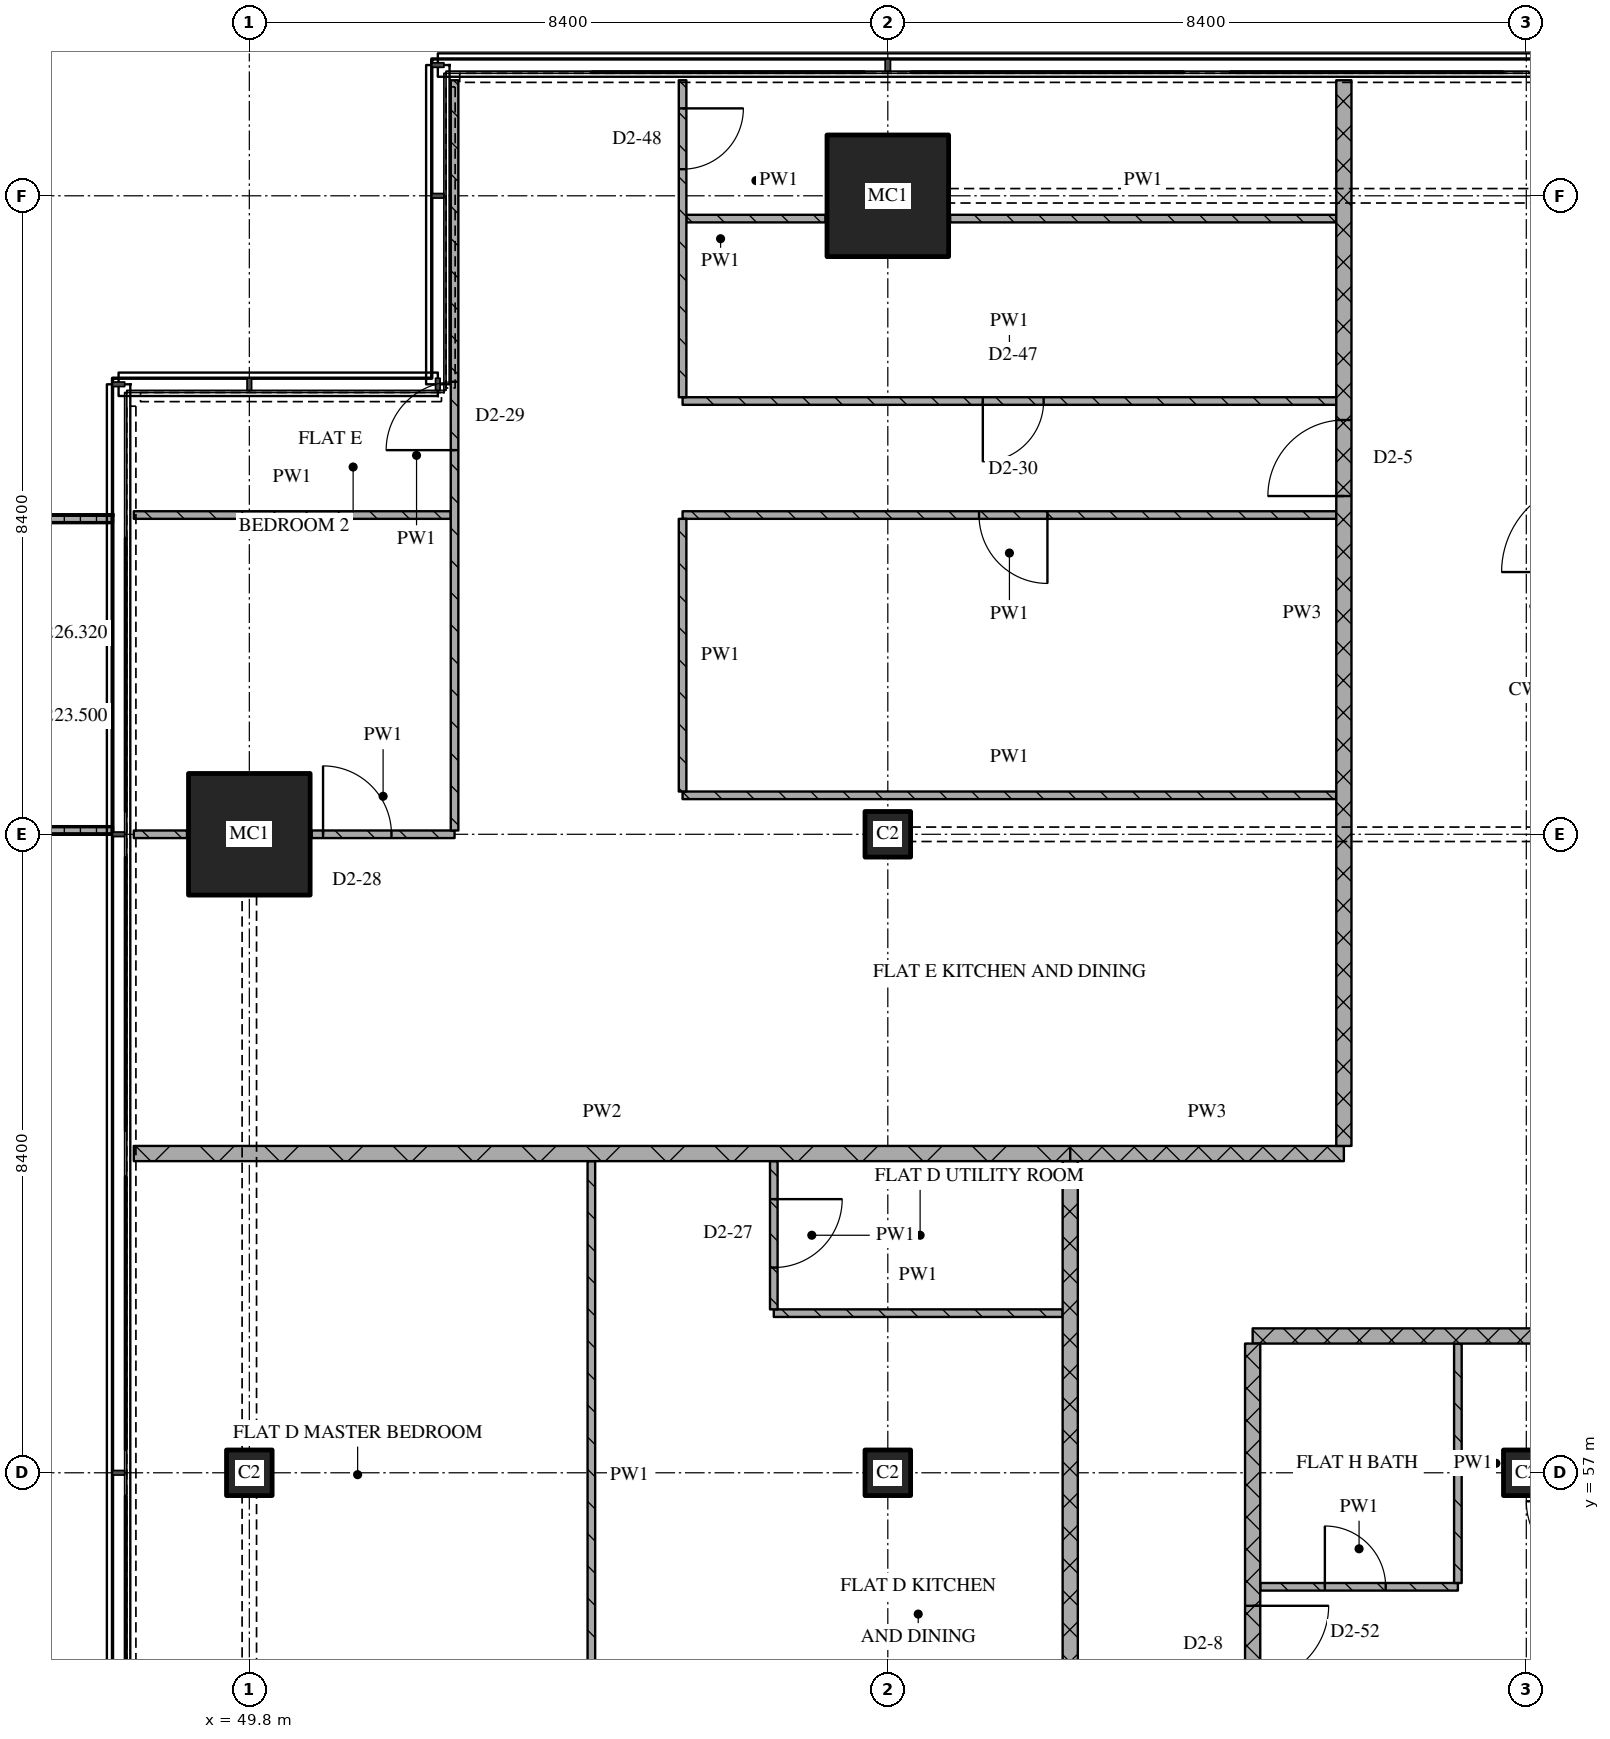
"""IFC4 building model, lengths in metres.
Left out: names, types, materials, properties, quantities, classifications, styles, units other than length and angle.
Written with IfcOpenShell. Run it as: python <this file> out.ifc"""

import sys

from ifc_helpers import new_model, si_unit, direction, frame, frame_2d, origin, origin_2d, place, context, subcontext, project, spatial, polyline, rectangle, outline, extrude, element, fill, save


model = new_model("IFC4")
c1 = context("Model", 3, precision=1e-05, world=origin(), true_north=direction((0.0, 1.0)))
c2 = subcontext(c1, "Body", "Model", "MODEL_VIEW")
j1 = project(units=[si_unit("LENGTHUNIT", "METRE"), si_unit("PLANEANGLEUNIT", "RADIAN")], contexts=[c1])
p1 = place(None, origin())
s1 = spatial("IfcSite", under=j1, at=p1, CompositionType="ELEMENT")
p2 = place(p1, origin())
s2 = spatial("IfcBuilding", under=s1, at=p2, CompositionType="ELEMENT")
p3 = place(p2, frame((0.0, 0.0, 223.5)))
s3 = spatial("IfcBuildingStorey", under=s2, at=p3, CompositionType="ELEMENT", Elevation=223.5)
p4 = place(p3, frame((49.8, 57.0, 0.0), z_axis=(0.0, 0.0, 1.0), x_axis=(1.0, 0.0, 0.0)))
e1 = element("IfcColumn", 1, at=p4, inside=s3, PredefinedType="COLUMN", context=c2, shape_type="SweptSolid", body=[
    extrude(rectangle(XDim=0.6, YDim=0.6, at=origin_2d()), origin(), (0.0, 0.0, 1.0), 3.6),
])
p5 = place(p3, frame((49.8, 65.4, 0.0), z_axis=(0.0, 0.0, 1.0), x_axis=(1.0, 0.0, 0.0)))
e2 = element("IfcColumn", 2, at=p5, inside=s3, PredefinedType="COLUMN", context=c2, shape_type="SweptSolid", body=[
    extrude(rectangle(XDim=1.6, YDim=1.6, at=origin_2d()), origin(), (0.0, 0.0, 1.0), 3.6),
])
for number, where, z_axis, x_axis in (
    (3, (58.2, 57.0, 0.0), (0.0, 0.0, 1.0), (1.0, 0.0, 0.0)),
    (4, (58.2, 65.4, 0.0), (0.0, 0.0, 1.0), (1.0, 0.0, 0.0)),
):
    element("IfcColumn", number, at=place(p3, frame(where, z_axis=z_axis, x_axis=x_axis)), inside=s3, PredefinedType="COLUMN", context=c2, shape_type="SweptSolid", body=[
        extrude(rectangle(XDim=0.6, YDim=0.6, at=origin_2d()), origin(), (0.0, 0.0, 1.0), 3.6),
    ])
p6 = place(p3, frame((58.2, 73.8, 0.0), z_axis=(0.0, 0.0, 1.0), x_axis=(1.0, 0.0, 0.0)))
e5 = element("IfcColumn", 5, at=p6, inside=s3, PredefinedType="COLUMN", context=c2, shape_type="SweptSolid", body=[
    extrude(rectangle(XDim=1.6, YDim=1.6, at=origin_2d()), origin(), (0.0, 0.0, 1.0), 3.6),
])
p7 = place(p3, frame((66.6, 57.0, 0.0), z_axis=(0.0, 0.0, 1.0), x_axis=(1.0, 0.0, 0.0)))
e6 = element("IfcColumn", 6, at=p7, inside=s3, PredefinedType="COLUMN", context=c2, shape_type="SweptSolid", body=[
    extrude(rectangle(XDim=0.6, YDim=0.6, at=origin_2d()), origin(), (0.0, 0.0, 1.0), 3.6),
])
p8 = place(p3, origin())
e7 = element("IfcWall", 7, at=p8, inside=s3, PredefinedType="SOLIDWALL", context=c2, shape_type="SweptSolid", body=[
    extrude(outline(polyline([(48.0, 69.6), (48.0, 69.5), (46.367, 69.5), (46.367, 65.5), (48.0, 65.5), (48.0, 65.4), (46.267, 65.4), (46.267, 69.6), (48.0, 69.6)])), origin(), (0.0, 0.0, 1.0), 1.0),
])
p9 = place(p3, frame((63.1, 55.5, 0.0), z_axis=(0.0, 0.0, 1.0), x_axis=(1.0, 0.0, 0.0)))
e8 = element("IfcWall", 8, at=p9, inside=s3, PredefinedType="PARTITIONING", context=c2, shape_type="SweptSolid", body=[
    extrude(rectangle(XDim=2.6, YDim=0.1, at=frame_2d((1.3, 0.0))), origin(), (0.0, 0.0, 1.0), 3.32),
])
p10 = place(p9, frame((0.85, 0.0, 0.0)))
e9 = element("IfcOpeningElement", 9, at=p10, cuts=e8, PredefinedType="OPENING", context=c2, shape_type="SweptSolid", body=[
    extrude(rectangle(XDim=0.8, YDim=2.1, at=frame_2d((0.4, 1.05))), frame((0.0, 0.06, 0.0), z_axis=(0.0, -1.0, 0.0), x_axis=(1.0, 0.0, 0.0)), (0.0, 0.0, 1.0), 0.12),
])
p11 = place(p3, frame((63.0, 58.8, 0.0), z_axis=(0.0, 0.0, 1.0), x_axis=(1.0, 0.0, 0.0)))
e10 = element("IfcWall", 10, at=p11, inside=s3, PredefinedType="PARTITIONING", context=c2, shape_type="SweptSolid", body=[
    extrude(rectangle(XDim=10.8, YDim=0.2, at=frame_2d((5.4, 0.0))), origin(), (0.0, 0.0, 1.0), 3.32),
])
p12 = place(p3, frame((56.7, 59.1, 0.0), z_axis=(0.0, 0.0, 1.0), x_axis=(1.0, 0.0, 0.0)))
e11 = element("IfcWall", 11, at=p12, inside=s3, PredefinedType="PARTITIONING", context=c2, shape_type="SweptSolid", body=[
    extrude(rectangle(XDim=3.8, YDim=0.1, at=frame_2d((1.9, 0.0))), origin(), (0.0, 0.0, 1.0), 3.32),
])
p13 = place(p3, frame((60.6, 61.2, 0.0), z_axis=(0.0, 0.0, 1.0), x_axis=(1.0, 0.0, 0.0)))
e12 = element("IfcWall", 12, at=p13, inside=s3, PredefinedType="PARTITIONING", context=c2, shape_type="SweptSolid", body=[
    extrude(rectangle(XDim=3.6, YDim=0.2, at=frame_2d((1.8, 0.0))), origin(), (0.0, 0.0, 1.0), 3.32),
])
p14 = place(p3, frame((48.28, 61.2, 0.0), z_axis=(0.0, 0.0, 1.0), x_axis=(1.0, 0.0, 0.0)))
e13 = element("IfcWall", 13, at=p14, inside=s3, PredefinedType="PARTITIONING", context=c2, shape_type="SweptSolid", body=[
    extrude(rectangle(XDim=12.32, YDim=0.2, at=frame_2d((6.16, 0.0))), origin(), (0.0, 0.0, 1.0), 3.32),
])
p15 = place(p3, frame((48.28, 65.4, 0.0), z_axis=(0.0, 0.0, 1.0), x_axis=(1.0, 0.0, 0.0)))
e14 = element("IfcWall", 14, at=p15, inside=s3, PredefinedType="PARTITIONING", context=c2, shape_type="SweptSolid", body=[
    extrude(rectangle(XDim=0.7, YDim=0.1, at=frame_2d((0.35, 0.0))), origin(), (0.0, 0.0, 1.0), 3.32),
])
p16 = place(p3, frame((50.62, 65.4, 0.0), z_axis=(0.0, 0.0, 1.0), x_axis=(1.0, 0.0, 0.0)))
e15 = element("IfcWall", 15, at=p16, inside=s3, PredefinedType="PARTITIONING", context=c2, shape_type="SweptSolid", body=[
    extrude(rectangle(XDim=1.88, YDim=0.1, at=frame_2d((0.94, 0.0))), origin(), (0.0, 0.0, 1.0), 3.32),
])
p17 = place(p16, frame((0.15, 0.0, 0.0)))
e16 = element("IfcOpeningElement", 16, at=p17, cuts=e15, PredefinedType="OPENING", context=c2, shape_type="SweptSolid", body=[
    extrude(rectangle(XDim=0.9, YDim=2.1, at=frame_2d((0.45, 1.05))), frame((0.0, 0.06, 0.0), z_axis=(0.0, -1.0, 0.0), x_axis=(1.0, 0.0, 0.0)), (0.0, 0.0, 1.0), 0.12),
])
p18 = place(p3, frame((55.5, 65.913, 0.0), z_axis=(0.0, 0.0, 1.0), x_axis=(1.0, 0.0, 0.0)))
e17 = element("IfcWall", 17, at=p18, inside=s3, PredefinedType="PARTITIONING", context=c2, shape_type="SweptSolid", body=[
    extrude(rectangle(XDim=8.6, YDim=0.1, at=frame_2d((4.3, 0.0))), origin(), (0.0, 0.0, 1.0), 3.32),
])
p19 = place(p3, frame((48.28, 69.6, 0.0), z_axis=(0.0, 0.0, 1.0), x_axis=(1.0, 0.0, 0.0)))
e18 = element("IfcWall", 18, at=p19, inside=s3, PredefinedType="PARTITIONING", context=c2, shape_type="SweptSolid", body=[
    extrude(rectangle(XDim=4.17, YDim=0.1, at=frame_2d((2.085, 0.0))), origin(), (0.0, 0.0, 1.0), 3.32),
])
p20 = place(p3, frame((64.1, 69.6, 0.0), z_axis=(0.0, 0.0, 1.0), x_axis=(-1.0, 0.0, 0.0)))
e19 = element("IfcWall", 19, at=p20, inside=s3, PredefinedType="PARTITIONING", context=c2, shape_type="SweptSolid", body=[
    extrude(rectangle(XDim=8.6, YDim=0.1, at=frame_2d((4.3, 0.0))), origin(), (0.0, 0.0, 1.0), 3.32),
])
p21 = place(p20, frame((3.8, 0.0, 0.0)))
e20 = element("IfcOpeningElement", 20, at=p21, cuts=e19, PredefinedType="OPENING", context=c2, shape_type="SweptSolid", body=[
    extrude(rectangle(XDim=0.9, YDim=2.1, at=frame_2d((0.45, 1.05))), frame((0.0, 0.06, 0.0), z_axis=(0.0, -1.0, 0.0), x_axis=(1.0, 0.0, 0.0)), (0.0, 0.0, 1.0), 0.12),
])
p22 = place(p3, frame((55.5, 71.1, 0.0), z_axis=(0.0, 0.0, 1.0), x_axis=(1.0, 0.0, 0.0)))
e21 = element("IfcWall", 21, at=p22, inside=s3, PredefinedType="PARTITIONING", context=c2, shape_type="SweptSolid", body=[
    extrude(rectangle(XDim=8.6, YDim=0.1, at=frame_2d((4.3, 0.0))), origin(), (0.0, 0.0, 1.0), 3.32),
])
p23 = place(p22, frame((3.95, 0.0, 0.0)))
e22 = element("IfcOpeningElement", 22, at=p23, cuts=e21, PredefinedType="OPENING", context=c2, shape_type="SweptSolid", body=[
    extrude(rectangle(XDim=0.8, YDim=2.1, at=frame_2d((0.4, 1.05))), frame((0.0, 0.06, 0.0), z_axis=(0.0, -1.0, 0.0), x_axis=(1.0, 0.0, 0.0)), (0.0, 0.0, 1.0), 0.12),
])
p24 = place(p3, frame((55.55, 73.5, 0.0), z_axis=(0.0, 0.0, 1.0), x_axis=(1.0, 0.0, 0.0)))
e23 = element("IfcWall", 23, at=p24, inside=s3, PredefinedType="PARTITIONING", context=c2, shape_type="SweptSolid", body=[
    extrude(rectangle(XDim=1.83, YDim=0.1, at=frame_2d((0.915, 0.0))), origin(), (0.0, 0.0, 1.0), 3.32),
])
p25 = place(p3, frame((59.02, 73.5, 0.0), z_axis=(0.0, 0.0, 1.0), x_axis=(1.0, 0.0, 0.0)))
e24 = element("IfcWall", 24, at=p25, inside=s3, PredefinedType="PARTITIONING", context=c2, shape_type="SweptSolid", body=[
    extrude(rectangle(XDim=5.08, YDim=0.1, at=frame_2d((2.54, 0.0))), origin(), (0.0, 0.0, 1.0), 3.32),
])
p26 = place(p3, frame((52.5, 65.45, 0.0), z_axis=(0.0, 0.0, 1.0), x_axis=(0.0, 1.0, 0.0)))
e25 = element("IfcWall", 25, at=p26, inside=s3, PredefinedType="PARTITIONING", context=c2, shape_type="SweptSolid", body=[
    extrude(rectangle(XDim=9.87, YDim=0.1, at=frame_2d((4.935, 0.0))), origin(), (0.0, 0.0, 1.0), 3.32),
])
p27 = place(p26, frame((5.004, 0.0, 0.0)))
e26 = element("IfcOpeningElement", 26, at=p27, cuts=e25, PredefinedType="OPENING", context=c2, shape_type="SweptSolid", body=[
    extrude(rectangle(XDim=0.9, YDim=2.1, at=frame_2d((0.45, 1.05))), frame((0.0, 0.06, 0.0), z_axis=(0.0, -1.0, 0.0), x_axis=(1.0, 0.0, 0.0)), (0.0, 0.0, 1.0), 0.12),
])
p28 = place(p3, frame((54.3, 61.1, 0.0), z_axis=(0.0, 0.0, 1.0), x_axis=(0.0, -1.0, 0.0)))
e27 = element("IfcWall", 27, at=p28, inside=s3, PredefinedType="PARTITIONING", context=c2, shape_type="SweptSolid", body=[
    extrude(rectangle(XDim=8.25, YDim=0.1, at=frame_2d((4.125, 0.0))), origin(), (0.0, 0.0, 1.0), 3.32),
])
p29 = place(p3, frame((55.5, 69.55, 0.0), z_axis=(0.0, 0.0, 1.0), x_axis=(0.0, -1.0, 0.0)))
e28 = element("IfcWall", 28, at=p29, inside=s3, PredefinedType="PARTITIONING", context=c2, shape_type="SweptSolid", body=[
    extrude(rectangle(XDim=3.587, YDim=0.1, at=frame_2d((1.794, 0.0))), origin(), (0.0, 0.0, 1.0), 3.32),
])
p30 = place(p3, frame((55.5, 75.32, 0.0), z_axis=(0.0, 0.0, 1.0), x_axis=(0.0, -1.0, 0.0)))
e29 = element("IfcWall", 29, at=p30, inside=s3, PredefinedType="PARTITIONING", context=c2, shape_type="SweptSolid", body=[
    extrude(rectangle(XDim=4.17, YDim=0.1, at=frame_2d((2.085, 0.0))), origin(), (0.0, 0.0, 1.0), 3.32),
])
p31 = place(p30, frame((0.37, 0.0, 0.0)))
e30 = element("IfcOpeningElement", 30, at=p31, cuts=e29, PredefinedType="OPENING", context=c2, shape_type="SweptSolid", body=[
    extrude(rectangle(XDim=0.8, YDim=2.1, at=frame_2d((0.4, 1.05))), frame((0.0, 0.06, 0.0), z_axis=(0.0, -1.0, 0.0), x_axis=(1.0, 0.0, 0.0)), (0.0, 0.0, 1.0), 0.12),
])
p32 = place(p3, frame((56.7, 61.1, 0.0), z_axis=(0.0, 0.0, 1.0), x_axis=(0.0, -1.0, 0.0)))
e31 = element("IfcWall", 31, at=p32, inside=s3, PredefinedType="PARTITIONING", context=c2, shape_type="SweptSolid", body=[
    extrude(rectangle(XDim=1.95, YDim=0.1, at=frame_2d((0.975, 0.0))), origin(), (0.0, 0.0, 1.0), 3.32),
])
p33 = place(p32, frame((0.5, 0.0, 0.0)))
e32 = element("IfcOpeningElement", 32, at=p33, cuts=e31, PredefinedType="OPENING", context=c2, shape_type="SweptSolid", body=[
    extrude(rectangle(XDim=0.9, YDim=2.1, at=frame_2d((0.45, 1.05))), frame((0.0, 0.06, 0.0), z_axis=(0.0, -1.0, 0.0), x_axis=(1.0, 0.0, 0.0)), (0.0, 0.0, 1.0), 0.12),
])
p34 = place(p3, frame((60.6, 43.3, 0.0), z_axis=(0.0, 0.0, 1.0), x_axis=(0.0, 1.0, 0.0)))
e33 = element("IfcWall", 33, at=p34, inside=s3, PredefinedType="PARTITIONING", context=c2, shape_type="SweptSolid", body=[
    extrude(rectangle(XDim=17.8, YDim=0.2, at=frame_2d((8.9, 0.0))), origin(), (0.0, 0.0, 1.0), 3.32),
])
p35 = place(p34, frame((7.05, 0.0, 0.0)))
e34 = element("IfcOpeningElement", 34, at=p35, cuts=e33, PredefinedType="OPENING", context=c2, shape_type="SweptSolid", body=[
    extrude(rectangle(XDim=1.0, YDim=2.1, at=frame_2d((0.5, 1.05))), frame((0.0, 0.11, 0.0), z_axis=(0.0, -1.0, 0.0), x_axis=(1.0, 0.0, 0.0)), (0.0, 0.0, 1.0), 0.22),
])
p36 = place(p3, frame((63.0, 58.7, 0.0), z_axis=(0.0, 0.0, 1.0), x_axis=(0.0, -1.0, 0.0)))
e35 = element("IfcWall", 35, at=p36, inside=s3, PredefinedType="PARTITIONING", context=c2, shape_type="SweptSolid", body=[
    extrude(rectangle(XDim=15.4, YDim=0.2, at=frame_2d((7.7, 0.0))), origin(), (0.0, 0.0, 1.0), 3.32),
])
p37 = place(p36, frame((3.45, 0.0, 0.0)))
e36 = element("IfcOpeningElement", 36, at=p37, cuts=e35, PredefinedType="OPENING", context=c2, shape_type="SweptSolid", body=[
    extrude(rectangle(XDim=1.0, YDim=2.1, at=frame_2d((0.5, 1.05))), frame((0.0, 0.11, 0.0), z_axis=(0.0, -1.0, 0.0), x_axis=(1.0, 0.0, 0.0)), (0.0, 0.0, 1.0), 0.22),
])
p38 = place(p36, frame((11.25, 0.0, 0.0)))
e37 = element("IfcOpeningElement", 37, at=p38, cuts=e35, PredefinedType="OPENING", context=c2, shape_type="SweptSolid", body=[
    extrude(rectangle(XDim=0.9, YDim=2.1, at=frame_2d((0.45, 1.05))), frame((0.0, 0.11, 0.0), z_axis=(0.0, -1.0, 0.0), x_axis=(1.0, 0.0, 0.0)), (0.0, 0.0, 1.0), 0.22),
])
p39 = place(p3, frame((64.2, 61.3, 0.0), z_axis=(0.0, 0.0, 1.0), x_axis=(0.0, 1.0, 0.0)))
e38 = element("IfcWall", 38, at=p39, inside=s3, PredefinedType="PARTITIONING", context=c2, shape_type="SweptSolid", body=[
    extrude(rectangle(XDim=14.02, YDim=0.2, at=frame_2d((7.01, 0.0))), origin(), (0.0, 0.0, 1.0), 3.32),
])
p40 = place(p39, frame((8.55, 0.0, 0.0)))
e39 = element("IfcOpeningElement", 39, at=p40, cuts=e38, PredefinedType="OPENING", context=c2, shape_type="SweptSolid", body=[
    extrude(rectangle(XDim=1.0, YDim=2.1, at=frame_2d((0.5, 1.05))), frame((0.0, 0.11, 0.0), z_axis=(0.0, -1.0, 0.0), x_axis=(1.0, 0.0, 0.0)), (0.0, 0.0, 1.0), 0.22),
])
p41 = place(p3, frame((65.7, 58.7, 0.0), z_axis=(0.0, 0.0, 1.0), x_axis=(0.0, -1.0, 0.0)))
e40 = element("IfcWall", 40, at=p41, inside=s3, PredefinedType="PARTITIONING", context=c2, shape_type="SweptSolid", body=[
    extrude(rectangle(XDim=3.15, YDim=0.1, at=frame_2d((1.575, 0.0))), origin(), (0.0, 0.0, 1.0), 3.32),
])
p42 = place(p10, origin())
e41 = element("IfcDoor", 41, at=p42, inside=s3, OperationType="SINGLE_SWING_LEFT", PredefinedType="DOOR", context=c2, shape_type="SweptSolid", body=[
    extrude(rectangle(XDim=0.8, YDim=2.1, at=frame_2d((0.4, 1.05))), frame((0.0, 0.025, 0.0), z_axis=(0.0, -1.0, 0.0), x_axis=(1.0, 0.0, 0.0)), (0.0, 0.0, 1.0), 0.05),
])
fill(e9, e41)
p43 = place(p17, origin())
e42 = element("IfcDoor", 42, at=p43, inside=s3, OperationType="SINGLE_SWING_LEFT", PredefinedType="DOOR", context=c2, shape_type="SweptSolid", body=[
    extrude(rectangle(XDim=0.9, YDim=2.1, at=frame_2d((0.45, 1.05))), frame((0.0, 0.025, 0.0), z_axis=(0.0, -1.0, 0.0), x_axis=(1.0, 0.0, 0.0)), (0.0, 0.0, 1.0), 0.05),
])
fill(e16, e42)
p44 = place(p21, origin())
e43 = element("IfcDoor", 43, at=p44, inside=s3, OperationType="SINGLE_SWING_LEFT", PredefinedType="DOOR", context=c2, shape_type="SweptSolid", body=[
    extrude(rectangle(XDim=0.9, YDim=2.1, at=frame_2d((0.45, 1.05))), frame((0.0, 0.025, 0.0), z_axis=(0.0, -1.0, 0.0), x_axis=(1.0, 0.0, 0.0)), (0.0, 0.0, 1.0), 0.05),
])
fill(e20, e43)
p45 = place(p23, origin())
e44 = element("IfcDoor", 44, at=p45, inside=s3, OperationType="SINGLE_SWING_RIGHT", PredefinedType="DOOR", context=c2, shape_type="SweptSolid", body=[
    extrude(rectangle(XDim=0.8, YDim=2.1, at=frame_2d((0.4, 1.05))), frame((0.0, 0.025, 0.0), z_axis=(0.0, -1.0, 0.0), x_axis=(1.0, 0.0, 0.0)), (0.0, 0.0, 1.0), 0.05),
])
fill(e22, e44)
p46 = place(p27, origin())
e45 = element("IfcDoor", 45, at=p46, inside=s3, OperationType="SINGLE_SWING_LEFT", PredefinedType="DOOR", context=c2, shape_type="SweptSolid", body=[
    extrude(rectangle(XDim=0.9, YDim=2.1, at=frame_2d((0.45, 1.05))), frame((0.0, 0.025, 0.0), z_axis=(0.0, -1.0, 0.0), x_axis=(1.0, 0.0, 0.0)), (0.0, 0.0, 1.0), 0.05),
])
fill(e26, e45)
p47 = place(p31, origin())
e46 = element("IfcDoor", 46, at=p47, inside=s3, OperationType="SINGLE_SWING_LEFT", PredefinedType="DOOR", context=c2, shape_type="SweptSolid", body=[
    extrude(rectangle(XDim=0.8, YDim=2.1, at=frame_2d((0.4, 1.05))), frame((0.0, 0.025, 0.0), z_axis=(0.0, -1.0, 0.0), x_axis=(1.0, 0.0, 0.0)), (0.0, 0.0, 1.0), 0.05),
])
fill(e30, e46)
p48 = place(p33, origin())
e47 = element("IfcDoor", 47, at=p48, inside=s3, OperationType="SINGLE_SWING_LEFT", PredefinedType="DOOR", context=c2, shape_type="SweptSolid", body=[
    extrude(rectangle(XDim=0.9, YDim=2.1, at=frame_2d((0.45, 1.05))), frame((0.0, 0.025, 0.0), z_axis=(0.0, -1.0, 0.0), x_axis=(1.0, 0.0, 0.0)), (0.0, 0.0, 1.0), 0.05),
])
fill(e32, e47)
p49 = place(p37, origin())
e48 = element("IfcDoor", 48, at=p49, inside=s3, OperationType="SINGLE_SWING_LEFT", PredefinedType="DOOR", context=c2, shape_type="SweptSolid", body=[
    extrude(rectangle(XDim=1.0, YDim=2.1, at=frame_2d((0.5, 1.05))), frame((0.0, 0.025, 0.0), z_axis=(0.0, -1.0, 0.0), x_axis=(1.0, 0.0, 0.0)), (0.0, 0.0, 1.0), 0.05),
])
fill(e36, e48)
p50 = place(p40, origin())
e49 = element("IfcDoor", 49, at=p50, inside=s3, OperationType="SINGLE_SWING_LEFT", PredefinedType="DOOR", context=c2, shape_type="SweptSolid", body=[
    extrude(rectangle(XDim=1.0, YDim=2.1, at=frame_2d((0.5, 1.05))), frame((0.0, 0.025, 0.0), z_axis=(0.0, -1.0, 0.0), x_axis=(1.0, 0.0, 0.0)), (0.0, 0.0, 1.0), 0.05),
])
fill(e39, e49)
save(model, sys.argv[1])
